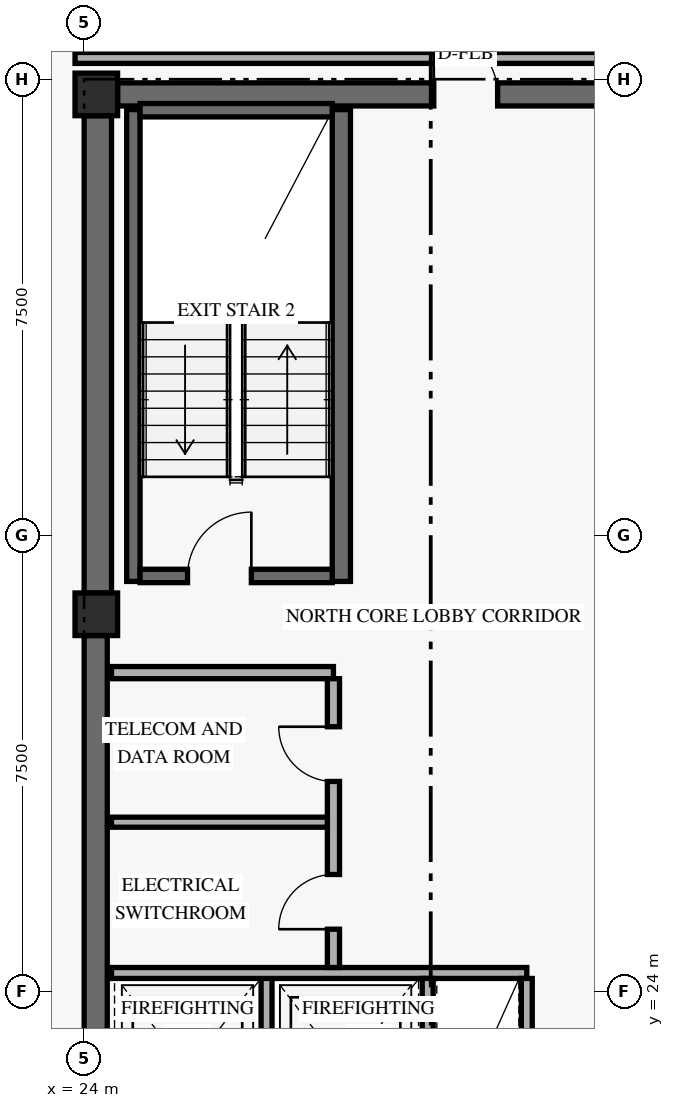
"""IFC4 building model, lengths in metres.
Left out: names, types, materials, properties, quantities, classifications, styles, units other than length and angle.
Written with IfcOpenShell. Run it as: python <this file> out.ifc"""

import sys

from ifc_helpers import new_model, si_unit, direction, frame, frame_2d, origin, origin_2d, place, context, subcontext, project, spatial, rectangle, extrude, element, fill, save


model = new_model("IFC4")
c1 = context("Model", 3, precision=1e-05, world=origin(), true_north=direction((0.0, 1.0)))
c2 = subcontext(c1, "Body", "Model", "MODEL_VIEW")
j1 = project(units=[si_unit("LENGTHUNIT", "METRE"), si_unit("PLANEANGLEUNIT", "RADIAN")], contexts=[c1])
p1 = place(None, origin())
s1 = spatial("IfcSite", under=j1, at=p1, CompositionType="ELEMENT")
p2 = place(p1, origin())
s2 = spatial("IfcBuilding", under=s1, at=p2, CompositionType="ELEMENT")
p3 = place(p2, frame((0.0, 0.0, 159.0)))
s3 = spatial("IfcBuildingStorey", under=s2, at=p3, CompositionType="ELEMENT", Elevation=159.0)
p4 = place(p3, frame((24.19, 17.9, 0.0), z_axis=(0.0, 0.0, 1.0), x_axis=(0.0, 1.0, 0.0)))
e1 = element("IfcWall", 1, at=p4, inside=s3, PredefinedType="SHEAR", context=c2, shape_type="SweptSolid", body=[
    extrude(rectangle(XDim=11.95, YDim=0.38, at=frame_2d((5.975, 0.0))), origin(), (0.0, 0.0, 1.0), 2.748),
])
p5 = place(p3, frame((24.225, 30.55, 0.0), z_axis=(0.0, 0.0, 1.0), x_axis=(0.0, 1.0, 0.0)))
e2 = element("IfcWall", 2, at=p5, inside=s3, PredefinedType="SHEAR", context=c2, shape_type="SweptSolid", body=[
    extrude(rectangle(XDim=7.85, YDim=0.45, at=frame_2d((3.925, 0.0))), origin(), (0.0, 0.0, 1.0), 2.748),
])
p6 = place(p3, frame((24.55, 38.75, 0.0), z_axis=(0.0, 0.0, 1.0), x_axis=(1.0, 0.0, 0.0)))
e3 = element("IfcWall", 3, at=p6, inside=s3, PredefinedType="SHEAR", context=c2, shape_type="SweptSolid", body=[
    extrude(rectangle(XDim=10.3, YDim=0.38, at=frame_2d((5.15, 0.0))), origin(), (0.0, 0.0, 1.0), 3.36),
])
p7 = place(p6, frame((5.2, 0.0, 0.0)))
e4 = element("IfcOpeningElement", 4, at=p7, cuts=e3, PredefinedType="OPENING", context=c2, shape_type="SweptSolid", body=[
    extrude(rectangle(XDim=1.05, YDim=2.15, at=frame_2d((0.525, 1.075))), frame((0.0, 0.2, 0.0), z_axis=(0.0, -1.0, 0.0), x_axis=(1.0, 0.0, 0.0)), (0.0, 0.0, 1.0), 0.4),
])
p8 = place(p3, frame((24.81, 30.74, 0.0), z_axis=(0.0, 0.0, 1.0), x_axis=(0.0, 1.0, 0.0)))
e5 = element("IfcWall", 5, at=p8, inside=s3, PredefinedType="SHEAR", context=c2, shape_type="SweptSolid", body=[
    extrude(rectangle(XDim=7.76, YDim=0.22, at=frame_2d((3.88, 0.0))), origin(), (0.0, 0.0, 1.0), 3.36),
])
p9 = place(p3, frame((28.23, 30.74, 0.0), z_axis=(0.0, 0.0, 1.0), x_axis=(0.0, 1.0, 0.0)))
e6 = element("IfcWall", 6, at=p9, inside=s3, PredefinedType="SHEAR", context=c2, shape_type="SweptSolid", body=[
    extrude(rectangle(XDim=7.76, YDim=0.3, at=frame_2d((3.88, 0.0))), origin(), (0.0, 0.0, 1.0), 3.36),
])
p10 = place(p3, frame((24.92, 30.83, 0.0), z_axis=(0.0, 0.0, 1.0), x_axis=(1.0, 0.0, 0.0)))
e7 = element("IfcWall", 7, at=p10, inside=s3, PredefinedType="SHEAR", context=c2, shape_type="SweptSolid", body=[
    extrude(rectangle(XDim=3.16, YDim=0.22, at=frame_2d((1.58, 0.0))), origin(), (0.0, 0.0, 1.0), 3.36),
])
p11 = place(p10, frame((0.78, 0.0, 0.0)))
e8 = element("IfcOpeningElement", 8, at=p11, cuts=e7, PredefinedType="OPENING", context=c2, shape_type="SweptSolid", body=[
    extrude(rectangle(XDim=1.05, YDim=2.15, at=frame_2d((0.525, 1.075))), frame((0.0, 0.12, 0.0), z_axis=(0.0, -1.0, 0.0), x_axis=(1.0, 0.0, 0.0)), (0.0, 0.0, 1.0), 0.24),
])
p12 = place(p3, frame((24.92, 38.49, 0.0), z_axis=(0.0, 0.0, 1.0), x_axis=(1.0, 0.0, 0.0)))
e9 = element("IfcWall", 9, at=p12, inside=s3, PredefinedType="SHEAR", context=c2, shape_type="SweptSolid", body=[
    extrude(rectangle(XDim=3.16, YDim=0.22, at=frame_2d((1.58, 0.0))), origin(), (0.0, 0.0, 1.0), 3.36),
])
for number, where, z_axis, x_axis in (
    (10, (24.2, 30.2, 0.0), (0.0, 0.0, 1.0), (1.0, 0.0, 0.0)),
    (11, (24.2, 38.75, 0.0), (0.0, 0.0, 1.0), (1.0, 0.0, 0.0)),
):
    element("IfcColumn", number, at=place(p3, frame(where, z_axis=z_axis, x_axis=x_axis)), inside=s3, PredefinedType="COLUMN", context=c2, shape_type="SweptSolid", body=[
        extrude(rectangle(XDim=0.7, YDim=0.7, at=origin_2d()), origin(), (0.0, 0.0, 1.0), 3.6),
    ])
p13 = place(p3, frame((27.0, 21.19, 0.0), z_axis=(0.0, 0.0, 1.0), x_axis=(0.0, 1.0, 0.0)))
e12 = element("IfcWall", 12, at=p13, inside=s3, PredefinedType="STANDARD", context=c2, shape_type="SweptSolid", body=[
    extrude(rectangle(XDim=3.11, YDim=0.18, at=frame_2d((1.555, 0.0))), origin(), (0.0, 0.0, 1.0), 3.36),
])
p14 = place(p3, frame((24.45, 24.3, 0.0), z_axis=(0.0, 0.0, 1.0), x_axis=(1.0, 0.0, 0.0)))
e13 = element("IfcWall", 13, at=p14, inside=s3, PredefinedType="STANDARD", context=c2, shape_type="SweptSolid", body=[
    extrude(rectangle(XDim=6.83, YDim=0.18, at=frame_2d((3.415, 0.0))), origin(), (0.0, 0.0, 1.0), 3.36),
])
for number, where, z_axis, x_axis in (
    (14, (29.65, 21.19, 0.0), (0.0, 0.0, 1.0), (0.0, 1.0, 0.0)),
    (15, (31.28, 21.19, 0.0), (0.0, 0.0, 1.0), (0.0, 1.0, 0.0)),
):
    element("IfcWall", number, at=place(p3, frame(where, z_axis=z_axis, x_axis=x_axis)), inside=s3, PredefinedType="STANDARD", context=c2, shape_type="SweptSolid", body=[
        extrude(rectangle(XDim=3.02, YDim=0.18, at=frame_2d((1.51, 0.0))), origin(), (0.0, 0.0, 1.0), 3.36),
    ])
p15 = place(p3, frame((24.45, 29.24, 0.0), z_axis=(0.0, 0.0, 1.0), x_axis=(1.0, 0.0, 0.0)))
e16 = element("IfcWall", 16, at=p15, inside=s3, PredefinedType="STANDARD", context=c2, shape_type="SweptSolid", body=[
    extrude(rectangle(XDim=3.65, YDim=0.2, at=frame_2d((1.825, 0.0))), origin(), (0.0, 0.0, 1.0), 3.36),
])
p16 = place(p3, frame((28.1, 24.39, 0.0), z_axis=(0.0, 0.0, 1.0), x_axis=(0.0, 1.0, 0.0)))
e17 = element("IfcWall", 17, at=p16, inside=s3, PredefinedType="STANDARD", context=c2, shape_type="SweptSolid", body=[
    extrude(rectangle(XDim=4.75, YDim=0.2, at=frame_2d((2.375, 0.0))), origin(), (0.0, 0.0, 1.0), 3.36),
])
p17 = place(p16, frame((0.63, 0.0, 0.0)))
e18 = element("IfcOpeningElement", 18, at=p17, cuts=e17, PredefinedType="OPENING", context=c2, shape_type="SweptSolid", body=[
    extrude(rectangle(XDim=0.9, YDim=2.1, at=frame_2d((0.45, 1.05))), frame((0.0, 0.11, 0.0), z_axis=(0.0, -1.0, 0.0), x_axis=(1.0, 0.0, 0.0)), (0.0, 0.0, 1.0), 0.22),
])
p18 = place(p16, frame((3.06, 0.0, 0.0)))
e19 = element("IfcOpeningElement", 19, at=p18, cuts=e17, PredefinedType="OPENING", context=c2, shape_type="SweptSolid", body=[
    extrude(rectangle(XDim=0.9, YDim=2.1, at=frame_2d((0.45, 1.05))), frame((0.0, 0.11, 0.0), z_axis=(0.0, -1.0, 0.0), x_axis=(1.0, 0.0, 0.0)), (0.0, 0.0, 1.0), 0.22),
])
p19 = place(p3, frame((24.45, 26.78, 0.0), z_axis=(0.0, 0.0, 1.0), x_axis=(1.0, 0.0, 0.0)))
e20 = element("IfcWall", 20, at=p19, inside=s3, PredefinedType="PARTITIONING", context=c2, shape_type="SweptSolid", body=[
    extrude(rectangle(XDim=3.55, YDim=0.165, at=frame_2d((1.775, 0.0))), origin(), (0.0, 0.0, 1.0), 3.36),
])
p20 = place(p3, frame((23.85, 39.35, 0.0), z_axis=(0.0, 0.0, 1.0), x_axis=(1.0, 0.0, 0.0)))
e21 = element("IfcWall", 21, at=p20, inside=s3, PredefinedType="STANDARD", context=c2, shape_type="SweptSolid", body=[
    extrude(rectangle(XDim=11.57, YDim=0.18, at=frame_2d((5.785, 0.0))), origin(), (0.0, 0.0, 1.0), 2.73),
])
p21 = place(p11, origin())
e22 = element("IfcDoor", 22, at=p21, inside=s3, OperationType="SINGLE_SWING_RIGHT", PredefinedType="DOOR", context=c2, shape_type="SweptSolid", body=[
    extrude(rectangle(XDim=1.05, YDim=2.15, at=frame_2d((0.525, 1.075))), frame((0.0, 0.025, 0.0), z_axis=(0.0, -1.0, 0.0), x_axis=(1.0, 0.0, 0.0)), (0.0, 0.0, 1.0), 0.05),
])
fill(e8, e22)
p22 = place(p17, origin())
e23 = element("IfcDoor", 23, at=p22, inside=s3, OperationType="SINGLE_SWING_LEFT", PredefinedType="DOOR", context=c2, shape_type="SweptSolid", body=[
    extrude(rectangle(XDim=0.9, YDim=2.1, at=frame_2d((0.45, 1.05))), frame((0.0, 0.025, 0.0), z_axis=(0.0, -1.0, 0.0), x_axis=(1.0, 0.0, 0.0)), (0.0, 0.0, 1.0), 0.05),
])
fill(e18, e23)
p23 = place(p18, origin())
e24 = element("IfcDoor", 24, at=p23, inside=s3, OperationType="SINGLE_SWING_RIGHT", PredefinedType="DOOR", context=c2, shape_type="SweptSolid", body=[
    extrude(rectangle(XDim=0.9, YDim=2.1, at=frame_2d((0.45, 1.05))), frame((0.0, 0.025, 0.0), z_axis=(0.0, -1.0, 0.0), x_axis=(1.0, 0.0, 0.0)), (0.0, 0.0, 1.0), 0.05),
])
fill(e19, e24)
p24 = place(p7, frame((1.05, 0.0, 0.0), z_axis=(0.0, 0.0, 1.0), x_axis=(-1.0, 0.0, 0.0)))
e25 = element("IfcDoor", 25, at=p24, inside=s3, OperationType="SINGLE_SWING_RIGHT", PredefinedType="DOOR", context=c2, shape_type="SweptSolid", body=[
    extrude(rectangle(XDim=1.05, YDim=2.15, at=frame_2d((0.525, 1.075))), frame((0.0, 0.025, 0.0), z_axis=(0.0, -1.0, 0.0), x_axis=(1.0, 0.0, 0.0)), (0.0, 0.0, 1.0), 0.05),
])
fill(e4, e25)
save(model, sys.argv[1])
